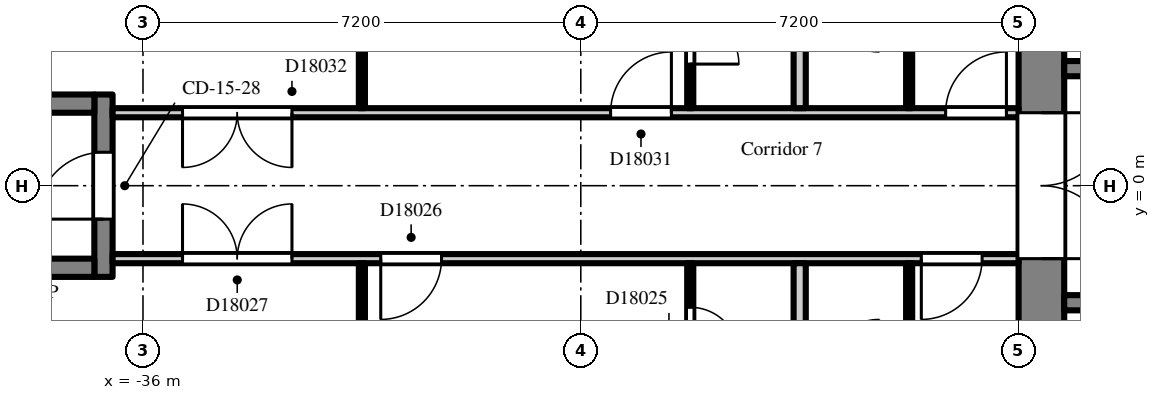
"""IFC4 building model, lengths in metres.
Left out: names, types, materials, properties, quantities, classifications, styles, units other than length and angle.
Written with IfcOpenShell. Run it as: python <this file> out.ifc"""

import sys

from ifc_helpers import new_model, si_unit, direction, frame, frame_2d, origin, place, context, subcontext, project, spatial, rectangle, extrude, element, fill, save


model = new_model("IFC4")
c1 = context("Model", 3, precision=1e-05, world=origin(), true_north=direction((0.0, 1.0)))
c2 = subcontext(c1, "Body", "Model", "MODEL_VIEW")
j1 = project(units=[si_unit("LENGTHUNIT", "METRE"), si_unit("PLANEANGLEUNIT", "RADIAN")], contexts=[c1])
p1 = place(None, origin())
s1 = spatial("IfcSite", under=j1, at=p1, CompositionType="ELEMENT")
p2 = place(p1, origin())
s2 = spatial("IfcBuilding", under=s1, at=p2, CompositionType="ELEMENT")
p3 = place(p2, frame((0.0, 0.0, 120.3)))
s3 = spatial("IfcBuildingStorey", under=s2, at=p3, CompositionType="ELEMENT", Elevation=120.3)
p4 = place(p3, frame((-21.225, -7.2, 0.0), z_axis=(0.0, 0.0, 1.0), x_axis=(0.0, 1.0, 0.0)))
e1 = element("IfcWall", 1, at=p4, inside=s3, PredefinedType="SHEAR", context=c2, shape_type="SweptSolid", body=[
    extrude(rectangle(XDim=14.4, YDim=0.75, at=frame_2d((7.2, 0.0))), origin(), (0.0, 0.0, 1.0), 2.6),
])
p5 = place(p4, frame((6.0, 0.0, 0.0)))
e2 = element("IfcOpeningElement", 2, at=p5, cuts=e1, PredefinedType="OPENING", context=c2, shape_type="SweptSolid", body=[
    extrude(rectangle(XDim=2.4, YDim=2.2, at=frame_2d((1.2, 1.1))), frame((0.0, 0.385, 0.0), z_axis=(0.0, -1.0, 0.0), x_axis=(1.0, 0.0, 0.0)), (0.0, 0.0, 1.0), 0.77),
])
p6 = place(p3, frame((-7.9, 1.925, 0.0), z_axis=(0.0, 0.0, 1.0), x_axis=(-1.0, 0.0, 0.0)))
e3 = element("IfcWall", 3, at=p6, inside=s3, PredefinedType="SHEAR", context=c2, shape_type="SweptSolid", body=[
    extrude(rectangle(XDim=12.95, YDim=0.25, at=frame_2d((6.475, 0.0))), origin(), (0.0, 0.0, 1.0), 2.6),
])
p7 = place(p6, frame((4.825, 0.0, 0.0)))
e4 = element("IfcOpeningElement", 4, at=p7, cuts=e3, PredefinedType="OPENING", context=c2, shape_type="SweptSolid", body=[
    extrude(rectangle(XDim=1.1, YDim=2.1, at=frame_2d((0.55, 1.05))), frame((0.0, 0.135, 0.0), z_axis=(0.0, -1.0, 0.0), x_axis=(1.0, 0.0, 0.0)), (0.0, 0.0, 1.0), 0.27),
])
p8 = place(p6, frame((7.025, 0.0, 0.0)))
e5 = element("IfcOpeningElement", 5, at=p8, cuts=e3, PredefinedType="OPENING", context=c2, shape_type="SweptSolid", body=[
    extrude(rectangle(XDim=1.1, YDim=2.1, at=frame_2d((0.55, 1.05))), frame((0.0, 0.135, 0.0), z_axis=(0.0, -1.0, 0.0), x_axis=(1.0, 0.0, 0.0)), (0.0, 0.0, 1.0), 0.27),
])
p9 = place(p6, frame((9.225, 0.0, 0.0)))
e6 = element("IfcOpeningElement", 6, at=p9, cuts=e3, PredefinedType="OPENING", context=c2, shape_type="SweptSolid", body=[
    extrude(rectangle(XDim=1.1, YDim=2.1, at=frame_2d((0.55, 1.05))), frame((0.0, 0.135, 0.0), z_axis=(0.0, -1.0, 0.0), x_axis=(1.0, 0.0, 0.0)), (0.0, 0.0, 1.0), 0.27),
])
p10 = place(p6, frame((0.525, 0.0, 0.0)))
e7 = element("IfcOpeningElement", 7, at=p10, cuts=e3, PredefinedType="OPENING", context=c2, shape_type="SweptSolid", body=[
    extrude(rectangle(XDim=0.9, YDim=2.1, at=frame_2d((0.45, 1.05))), frame((0.0, 0.135, 0.0), z_axis=(0.0, -1.0, 0.0), x_axis=(1.0, 0.0, 0.0)), (0.0, 0.0, 1.0), 0.27),
])
p11 = place(p6, frame((2.625, 0.0, 0.0)))
e8 = element("IfcOpeningElement", 8, at=p11, cuts=e3, PredefinedType="OPENING", context=c2, shape_type="SweptSolid", body=[
    extrude(rectangle(XDim=1.1, YDim=2.1, at=frame_2d((0.55, 1.05))), frame((0.0, 0.135, 0.0), z_axis=(0.0, -1.0, 0.0), x_axis=(1.0, 0.0, 0.0)), (0.0, 0.0, 1.0), 0.27),
])
p12 = place(p3, frame((-7.9, -1.925, 0.0), z_axis=(0.0, 0.0, 1.0), x_axis=(-1.0, 0.0, 0.0)))
e9 = element("IfcWall", 9, at=p12, inside=s3, PredefinedType="SHEAR", context=c2, shape_type="SweptSolid", body=[
    extrude(rectangle(XDim=12.95, YDim=0.25, at=frame_2d((6.475, 0.0))), origin(), (0.0, 0.0, 1.0), 2.6),
])
p13 = place(p12, frame((0.525, 0.0, 0.0)))
e10 = element("IfcOpeningElement", 10, at=p13, cuts=e9, PredefinedType="OPENING", context=c2, shape_type="SweptSolid", body=[
    extrude(rectangle(XDim=0.9, YDim=2.1, at=frame_2d((0.45, 1.05))), frame((0.0, 0.135, 0.0), z_axis=(0.0, -1.0, 0.0), x_axis=(1.0, 0.0, 0.0)), (0.0, 0.0, 1.0), 0.27),
])
p14 = place(p12, frame((2.625, 0.0, 0.0)))
e11 = element("IfcOpeningElement", 11, at=p14, cuts=e9, PredefinedType="OPENING", context=c2, shape_type="SweptSolid", body=[
    extrude(rectangle(XDim=1.1, YDim=2.1, at=frame_2d((0.55, 1.05))), frame((0.0, 0.135, 0.0), z_axis=(0.0, -1.0, 0.0), x_axis=(1.0, 0.0, 0.0)), (0.0, 0.0, 1.0), 0.27),
])
p15 = place(p3, frame((-36.65, -1.5, 0.0), z_axis=(0.0, 0.0, 1.0), x_axis=(0.0, 1.0, 0.0)))
e12 = element("IfcWall", 12, at=p15, inside=s3, PredefinedType="SHEAR", context=c2, shape_type="SweptSolid", body=[
    extrude(rectangle(XDim=3.0, YDim=0.3, at=frame_2d((1.5, 0.0))), origin(), (0.0, 0.0, 1.0), 2.6),
])
p16 = place(p15, frame((0.95, 0.0, 0.0)))
e13 = element("IfcOpeningElement", 13, at=p16, cuts=e12, PredefinedType="OPENING", context=c2, shape_type="SweptSolid", body=[
    extrude(rectangle(XDim=1.1, YDim=2.1, at=frame_2d((0.55, 1.05))), frame((0.0, 0.16, 0.0), z_axis=(0.0, -1.0, 0.0), x_axis=(1.0, 0.0, 0.0)), (0.0, 0.0, 1.0), 0.32),
])
for number, where, z_axis, x_axis in (
    (14, (-36.8, -1.35, 0.0), (0.0, 0.0, 1.0), (-1.0, 0.0, 0.0)),
    (15, (-36.8, 1.35, 0.0), (0.0, 0.0, 1.0), (-1.0, 0.0, 0.0)),
):
    element("IfcWall", number, at=place(p3, frame(where, z_axis=z_axis, x_axis=x_axis)), inside=s3, PredefinedType="SHEAR", context=c2, shape_type="SweptSolid", body=[
        extrude(rectangle(XDim=5.8, YDim=0.3, at=frame_2d((2.9, 0.0))), origin(), (0.0, 0.0, 1.0), 2.6),
    ])
p17 = place(p3, frame((-36.5, -1.2, 0.0), z_axis=(0.0, 0.0, 1.0), x_axis=(1.0, 0.0, 0.0)))
e16 = element("IfcWall", 16, at=p17, inside=s3, PredefinedType="PARTITIONING", context=c2, shape_type="SweptSolid", body=[
    extrude(rectangle(XDim=14.9, YDim=0.15, at=frame_2d((7.45, 0.0))), origin(), (0.0, 0.0, 1.0), 2.6),
])
p18 = place(p17, frame((13.3, 0.0, 0.0)))
e17 = element("IfcOpeningElement", 17, at=p18, cuts=e16, PredefinedType="OPENING", context=c2, shape_type="SweptSolid", body=[
    extrude(rectangle(XDim=1.0, YDim=2.1, at=frame_2d((0.5, 1.05))), frame((0.0, 0.085, 0.0), z_axis=(0.0, -1.0, 0.0), x_axis=(1.0, 0.0, 0.0)), (0.0, 0.0, 1.0), 0.17),
])
p19 = place(p17, frame((4.41, 0.0, 0.0)))
e18 = element("IfcOpeningElement", 18, at=p19, cuts=e16, PredefinedType="OPENING", context=c2, shape_type="SweptSolid", body=[
    extrude(rectangle(XDim=1.0, YDim=2.1, at=frame_2d((0.5, 1.05))), frame((0.0, 0.085, 0.0), z_axis=(0.0, -1.0, 0.0), x_axis=(1.0, 0.0, 0.0)), (0.0, 0.0, 1.0), 0.17),
])
p20 = place(p17, frame((1.15, 0.0, 0.0)))
e19 = element("IfcOpeningElement", 19, at=p20, cuts=e16, PredefinedType="OPENING", context=c2, shape_type="SweptSolid", body=[
    extrude(rectangle(XDim=1.8, YDim=2.1, at=frame_2d((0.9, 1.05))), frame((0.0, 0.085, 0.0), z_axis=(0.0, -1.0, 0.0), x_axis=(1.0, 0.0, 0.0)), (0.0, 0.0, 1.0), 0.17),
])
p21 = place(p3, frame((-36.5, 1.2, 0.0), z_axis=(0.0, 0.0, 1.0), x_axis=(1.0, 0.0, 0.0)))
e20 = element("IfcWall", 20, at=p21, inside=s3, PredefinedType="PARTITIONING", context=c2, shape_type="SweptSolid", body=[
    extrude(rectangle(XDim=14.9, YDim=0.15, at=frame_2d((7.45, 0.0))), origin(), (0.0, 0.0, 1.0), 2.6),
])
p22 = place(p21, frame((13.7, 0.0, 0.0)))
e21 = element("IfcOpeningElement", 21, at=p22, cuts=e20, PredefinedType="OPENING", context=c2, shape_type="SweptSolid", body=[
    extrude(rectangle(XDim=1.0, YDim=2.1, at=frame_2d((0.5, 1.05))), frame((0.0, 0.085, 0.0), z_axis=(0.0, -1.0, 0.0), x_axis=(1.0, 0.0, 0.0)), (0.0, 0.0, 1.0), 0.17),
])
p23 = place(p21, frame((8.19, 0.0, 0.0)))
e22 = element("IfcOpeningElement", 22, at=p23, cuts=e20, PredefinedType="OPENING", context=c2, shape_type="SweptSolid", body=[
    extrude(rectangle(XDim=1.0, YDim=2.1, at=frame_2d((0.5, 1.05))), frame((0.0, 0.085, 0.0), z_axis=(0.0, -1.0, 0.0), x_axis=(1.0, 0.0, 0.0)), (0.0, 0.0, 1.0), 0.17),
])
p24 = place(p21, frame((1.15, 0.0, 0.0)))
e23 = element("IfcOpeningElement", 23, at=p24, cuts=e20, PredefinedType="OPENING", context=c2, shape_type="SweptSolid", body=[
    extrude(rectangle(XDim=1.8, YDim=2.1, at=frame_2d((0.9, 1.05))), frame((0.0, 0.085, 0.0), z_axis=(0.0, -1.0, 0.0), x_axis=(1.0, 0.0, 0.0)), (0.0, 0.0, 1.0), 0.17),
])
for number, where, z_axis, x_axis in (
    (24, (-32.4, -6.9, 0.0), (0.0, 0.0, 1.0), (0.0, 1.0, 0.0)),
    (25, (-32.4, 1.275, 0.0), (0.0, 0.0, 1.0), (0.0, 1.0, 0.0)),
):
    element("IfcWall", number, at=place(p3, frame(where, z_axis=z_axis, x_axis=x_axis)), inside=s3, PredefinedType="PARTITIONING", context=c2, shape_type="SweptSolid", body=[
        extrude(rectangle(XDim=5.625, YDim=0.1, at=frame_2d((2.812, 0.0))), origin(), (0.0, 0.0, 1.0), 2.6),
    ])
p25 = place(p3, frame((-27.0, -3.65, 0.0), z_axis=(0.0, 0.0, 1.0), x_axis=(0.0, 1.0, 0.0)))
e26 = element("IfcWall", 26, at=p25, inside=s3, PredefinedType="PARTITIONING", context=c2, shape_type="SweptSolid", body=[
    extrude(rectangle(XDim=2.375, YDim=0.1, at=frame_2d((1.188, 0.0))), origin(), (0.0, 0.0, 1.0), 2.6),
])
p26 = place(p25, frame((0.85, 0.0, 0.0)))
e27 = element("IfcOpeningElement", 27, at=p26, cuts=e26, PredefinedType="OPENING", context=c2, shape_type="SweptSolid", body=[
    extrude(rectangle(XDim=0.8, YDim=2.1, at=frame_2d((0.4, 1.05))), frame((0.0, 0.06, 0.0), z_axis=(0.0, -1.0, 0.0), x_axis=(1.0, 0.0, 0.0)), (0.0, 0.0, 1.0), 0.12),
])
p27 = place(p3, frame((-27.0, 1.275, 0.0), z_axis=(0.0, 0.0, 1.0), x_axis=(0.0, 1.0, 0.0)))
e28 = element("IfcWall", 28, at=p27, inside=s3, PredefinedType="PARTITIONING", context=c2, shape_type="SweptSolid", body=[
    extrude(rectangle(XDim=2.375, YDim=0.1, at=frame_2d((1.188, 0.0))), origin(), (0.0, 0.0, 1.0), 2.6),
])
p28 = place(p27, frame((0.725, 0.0, 0.0)))
e29 = element("IfcOpeningElement", 29, at=p28, cuts=e28, PredefinedType="OPENING", context=c2, shape_type="SweptSolid", body=[
    extrude(rectangle(XDim=0.8, YDim=2.1, at=frame_2d((0.4, 1.05))), frame((0.0, 0.06, 0.0), z_axis=(0.0, -1.0, 0.0), x_axis=(1.0, 0.0, 0.0)), (0.0, 0.0, 1.0), 0.12),
])
for number, where, z_axis, x_axis in (
    (30, (-25.2, -6.9, 0.0), (0.0, 0.0, 1.0), (0.0, 1.0, 0.0)),
    (31, (-25.2, 1.275, 0.0), (0.0, 0.0, 1.0), (0.0, 1.0, 0.0)),
):
    element("IfcWall", number, at=place(p3, frame(where, z_axis=z_axis, x_axis=x_axis)), inside=s3, PredefinedType="PARTITIONING", context=c2, shape_type="SweptSolid", body=[
        extrude(rectangle(XDim=5.625, YDim=0.2, at=frame_2d((2.812, 0.0))), origin(), (0.0, 0.0, 1.0), 2.6),
    ])
for number, where, z_axis, x_axis in (
    (32, (-23.4, -2.95, 0.0), (0.0, 0.0, 1.0), (0.0, 1.0, 0.0)),
    (33, (-23.4, 1.275, 0.0), (0.0, 0.0, 1.0), (0.0, 1.0, 0.0)),
):
    element("IfcWall", number, at=place(p3, frame(where, z_axis=z_axis, x_axis=x_axis)), inside=s3, PredefinedType="PARTITIONING", context=c2, shape_type="SweptSolid", body=[
        extrude(rectangle(XDim=1.675, YDim=0.1, at=frame_2d((0.837, 0.0))), origin(), (0.0, 0.0, 1.0), 2.6),
    ])
p29 = place(p5, frame((2.4, 0.0, 0.0), z_axis=(0.0, 0.0, 1.0), x_axis=(-1.0, 0.0, 0.0)))
e34 = element("IfcDoor", 34, at=p29, inside=s3, OperationType="DOUBLE_DOOR_DOUBLE_SWING", PredefinedType="DOOR", context=c2, shape_type="SweptSolid", body=[
    extrude(rectangle(XDim=2.4, YDim=2.2, at=frame_2d((1.2, 1.1))), frame((0.0, 0.025, 0.0), z_axis=(0.0, -1.0, 0.0), x_axis=(1.0, 0.0, 0.0)), (0.0, 0.0, 1.0), 0.05),
])
fill(e2, e34)
p30 = place(p16, origin())
e35 = element("IfcDoor", 35, at=p30, inside=s3, OperationType="SINGLE_SWING_LEFT", PredefinedType="DOOR", context=c2, shape_type="SweptSolid", body=[
    extrude(rectangle(XDim=1.1, YDim=2.1, at=frame_2d((0.55, 1.05))), frame((0.0, 0.025, 0.0), z_axis=(0.0, -1.0, 0.0), x_axis=(1.0, 0.0, 0.0)), (0.0, 0.0, 1.0), 0.05),
])
fill(e13, e35)
p31 = place(p18, frame((1.0, 0.0, 0.0), z_axis=(0.0, 0.0, 1.0), x_axis=(-1.0, 0.0, 0.0)))
e36 = element("IfcDoor", 36, at=p31, inside=s3, OperationType="SINGLE_SWING_RIGHT", PredefinedType="DOOR", context=c2, shape_type="SweptSolid", body=[
    extrude(rectangle(XDim=1.0, YDim=2.1, at=frame_2d((0.5, 1.05))), frame((0.0, 0.025, 0.0), z_axis=(0.0, -1.0, 0.0), x_axis=(1.0, 0.0, 0.0)), (0.0, 0.0, 1.0), 0.05),
])
fill(e17, e36)
p32 = place(p26, frame((0.8, 0.0, 0.0), z_axis=(0.0, 0.0, 1.0), x_axis=(-1.0, 0.0, 0.0)))
e37 = element("IfcDoor", 37, at=p32, inside=s3, OperationType="SINGLE_SWING_RIGHT", PredefinedType="DOOR", context=c2, shape_type="SweptSolid", body=[
    extrude(rectangle(XDim=0.8, YDim=2.1, at=frame_2d((0.4, 1.05))), frame((0.0, 0.025, 0.0), z_axis=(0.0, -1.0, 0.0), x_axis=(1.0, 0.0, 0.0)), (0.0, 0.0, 1.0), 0.05),
])
fill(e27, e37)
p33 = place(p19, frame((1.0, 0.0, 0.0), z_axis=(0.0, 0.0, 1.0), x_axis=(-1.0, 0.0, 0.0)))
e38 = element("IfcDoor", 38, at=p33, inside=s3, OperationType="SINGLE_SWING_RIGHT", PredefinedType="DOOR", context=c2, shape_type="SweptSolid", body=[
    extrude(rectangle(XDim=1.0, YDim=2.1, at=frame_2d((0.5, 1.05))), frame((0.0, 0.025, 0.0), z_axis=(0.0, -1.0, 0.0), x_axis=(1.0, 0.0, 0.0)), (0.0, 0.0, 1.0), 0.05),
])
fill(e18, e38)
p34 = place(p20, origin())
e39 = element("IfcDoor", 39, at=p34, inside=s3, OperationType="DOUBLE_DOOR_DOUBLE_SWING", PredefinedType="DOOR", context=c2, shape_type="SweptSolid", body=[
    extrude(rectangle(XDim=1.8, YDim=2.1, at=frame_2d((0.9, 1.05))), frame((0.0, 0.025, 0.0), z_axis=(0.0, -1.0, 0.0), x_axis=(1.0, 0.0, 0.0)), (0.0, 0.0, 1.0), 0.05),
])
fill(e19, e39)
p35 = place(p22, origin())
e40 = element("IfcDoor", 40, at=p35, inside=s3, OperationType="SINGLE_SWING_RIGHT", PredefinedType="DOOR", context=c2, shape_type="SweptSolid", body=[
    extrude(rectangle(XDim=1.0, YDim=2.1, at=frame_2d((0.5, 1.05))), frame((0.0, 0.025, 0.0), z_axis=(0.0, -1.0, 0.0), x_axis=(1.0, 0.0, 0.0)), (0.0, 0.0, 1.0), 0.05),
])
fill(e21, e40)
p36 = place(p28, frame((0.8, 0.0, 0.0), z_axis=(0.0, 0.0, 1.0), x_axis=(-1.0, 0.0, 0.0)))
e41 = element("IfcDoor", 41, at=p36, inside=s3, OperationType="SINGLE_SWING_RIGHT", PredefinedType="DOOR", context=c2, shape_type="SweptSolid", body=[
    extrude(rectangle(XDim=0.8, YDim=2.1, at=frame_2d((0.4, 1.05))), frame((0.0, 0.025, 0.0), z_axis=(0.0, -1.0, 0.0), x_axis=(1.0, 0.0, 0.0)), (0.0, 0.0, 1.0), 0.05),
])
fill(e29, e41)
p37 = place(p23, origin())
e42 = element("IfcDoor", 42, at=p37, inside=s3, OperationType="SINGLE_SWING_RIGHT", PredefinedType="DOOR", context=c2, shape_type="SweptSolid", body=[
    extrude(rectangle(XDim=1.0, YDim=2.1, at=frame_2d((0.5, 1.05))), frame((0.0, 0.025, 0.0), z_axis=(0.0, -1.0, 0.0), x_axis=(1.0, 0.0, 0.0)), (0.0, 0.0, 1.0), 0.05),
])
fill(e22, e42)
p38 = place(p24, frame((1.8, 0.0, 0.0), z_axis=(0.0, 0.0, 1.0), x_axis=(-1.0, 0.0, 0.0)))
e43 = element("IfcDoor", 43, at=p38, inside=s3, OperationType="DOUBLE_DOOR_DOUBLE_SWING", PredefinedType="DOOR", context=c2, shape_type="SweptSolid", body=[
    extrude(rectangle(XDim=1.8, YDim=2.1, at=frame_2d((0.9, 1.05))), frame((0.0, 0.025, 0.0), z_axis=(0.0, -1.0, 0.0), x_axis=(1.0, 0.0, 0.0)), (0.0, 0.0, 1.0), 0.05),
])
fill(e23, e43)
save(model, sys.argv[1])
